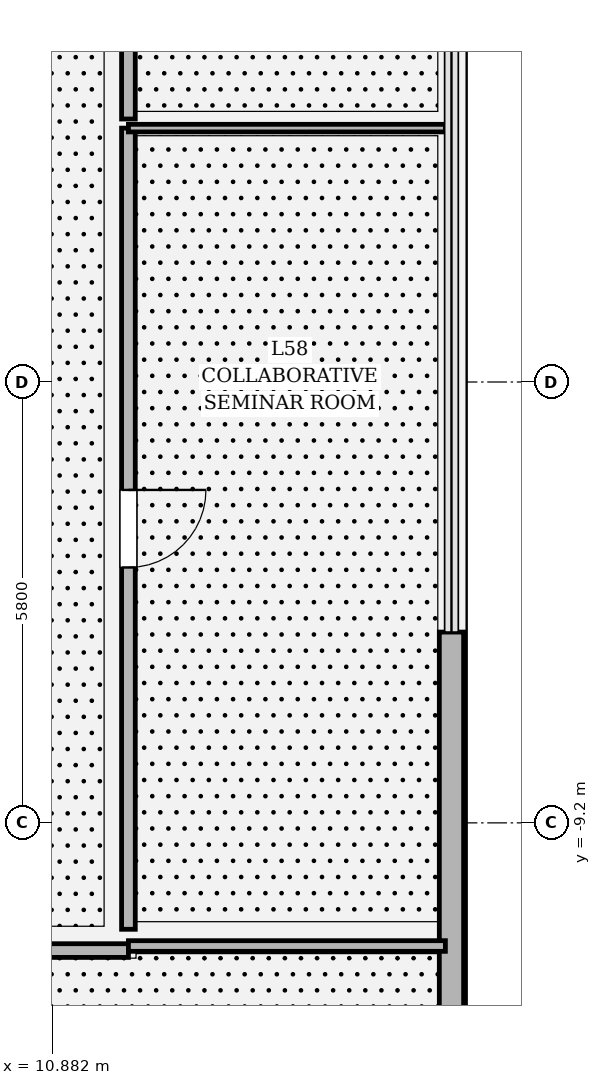
"""IFC4 building model, lengths in metres.
Left out: names, types, materials, properties, quantities, classifications, styles, units other than length and angle.
Written with IfcOpenShell. Run it as: python <this file> out.ifc"""

import sys

from ifc_helpers import new_model, si_unit, direction, frame, frame_2d, origin, place, context, subcontext, project, spatial, rectangle, extrude, element, fill, save


model = new_model("IFC4")
c1 = context("Model", 3, precision=1e-05, world=origin(), true_north=direction((0.0, 1.0)))
c2 = subcontext(c1, "Body", "Model", "MODEL_VIEW")
j1 = project(units=[si_unit("LENGTHUNIT", "METRE"), si_unit("PLANEANGLEUNIT", "RADIAN")], contexts=[c1])
p1 = place(None, origin())
s1 = spatial("IfcSite", under=j1, at=p1, CompositionType="ELEMENT")
p2 = place(p1, origin())
s2 = spatial("IfcBuilding", under=s1, at=p2, CompositionType="ELEMENT")
p3 = place(p2, frame((0.0, 0.0, 246.6)))
s3 = spatial("IfcBuildingStorey", under=s2, at=p3, CompositionType="ELEMENT", Elevation=246.6)
p4 = place(p3, frame((16.13, -13.727, 0.0), z_axis=(0.0, 0.0, 1.0), x_axis=(0.0, 1.0, 0.0)))
e1 = element("IfcWall", 1, at=p4, inside=s3, PredefinedType="SOLIDWALL", context=c2, shape_type="SweptSolid", body=[
    extrude(rectangle(XDim=7.037, YDim=0.32, at=frame_2d((3.519, 0.0))), origin(), (0.0, 0.0, 1.0), 3.194),
])
p5 = place(p3, frame((1.406, -10.88, 0.0), z_axis=(0.0, 0.0, 1.0), x_axis=(1.0, 0.0, 0.0)))
e2 = element("IfcWall", 2, at=p5, inside=s3, PredefinedType="PARTITIONING", context=c2, shape_type="SweptSolid", body=[
    extrude(rectangle(XDim=10.474, YDim=0.18, at=frame_2d((5.237, 0.0))), origin(), (0.0, 0.0, 1.0), 3.194),
])
p6 = place(p5, frame((4.712, 0.0, 0.0)))
e3 = element("IfcOpeningElement", 3, at=p6, cuts=e2, PredefinedType="OPENING", context=c2, shape_type="SweptSolid", body=[
    extrude(rectangle(XDim=1.05, YDim=2.2, at=frame_2d((0.525, 1.1))), frame((0.0, 0.1, 0.0), z_axis=(0.0, -1.0, 0.0), x_axis=(1.0, 0.0, 0.0)), (0.0, 0.0, 1.0), 0.2),
])
p7 = place(p3, frame((11.88, -10.82, 0.0), z_axis=(0.0, 0.0, 1.0), x_axis=(1.0, 0.0, 0.0)))
e4 = element("IfcWall", 4, at=p7, inside=s3, PredefinedType="PARTITIONING", context=c2, shape_type="SweptSolid", body=[
    extrude(rectangle(XDim=4.17, YDim=0.14, at=frame_2d((2.085, 0.0))), origin(), (0.0, 0.0, 1.0), 4.154),
])
p8 = place(p3, frame((11.88, -10.6, 0.0), z_axis=(0.0, 0.0, 1.0), x_axis=(0.0, 1.0, 0.0)))
e5 = element("IfcWall", 5, at=p8, inside=s3, PredefinedType="PARTITIONING", context=c2, shape_type="SweptSolid", body=[
    extrude(rectangle(XDim=10.54, YDim=0.18, at=frame_2d((5.27, 0.0))), origin(), (0.0, 0.0, 1.0), 3.194),
])
p9 = place(p8, frame((4.76, 0.0, 0.0)))
e6 = element("IfcOpeningElement", 6, at=p9, cuts=e5, PredefinedType="OPENING", context=c2, shape_type="SweptSolid", body=[
    extrude(rectangle(XDim=1.02, YDim=2.2, at=frame_2d((0.51, 1.1))), frame((0.0, 0.1, 0.0), z_axis=(0.0, -1.0, 0.0), x_axis=(1.0, 0.0, 0.0)), (0.0, 0.0, 1.0), 0.2),
])
p10 = place(p3, frame((11.88, -0.06, 0.0), z_axis=(0.0, 0.0, 1.0), x_axis=(1.0, 0.0, 0.0)))
e7 = element("IfcWall", 7, at=p10, inside=s3, PredefinedType="PARTITIONING", context=c2, shape_type="SweptSolid", body=[
    extrude(rectangle(XDim=4.17, YDim=0.1, at=frame_2d((2.085, 0.0))), origin(), (0.0, 0.0, 1.0), 4.52),
])
p11 = place(p3, frame((11.88, 0.06, 0.0), z_axis=(0.0, 0.0, 1.0), x_axis=(0.0, 1.0, 0.0)))
e8 = element("IfcWall", 8, at=p11, inside=s3, PredefinedType="PARTITIONING", context=c2, shape_type="SweptSolid", body=[
    extrude(rectangle(XDim=10.54, YDim=0.18, at=frame_2d((5.27, 0.0))), origin(), (0.0, 0.0, 1.0), 3.194),
])
p12 = place(p11, frame((4.76, 0.0, 0.0)))
e9 = element("IfcOpeningElement", 9, at=p12, cuts=e8, PredefinedType="OPENING", context=c2, shape_type="SweptSolid", body=[
    extrude(rectangle(XDim=1.02, YDim=2.2, at=frame_2d((0.51, 1.1))), frame((0.0, 0.1, 0.0), z_axis=(0.0, -1.0, 0.0), x_axis=(1.0, 0.0, 0.0)), (0.0, 0.0, 1.0), 0.2),
])
p13 = place(p9, origin())
e10 = element("IfcDoor", 10, at=p13, inside=s3, OperationType="SINGLE_SWING_RIGHT", PredefinedType="DOOR", context=c2, shape_type="SweptSolid", body=[
    extrude(rectangle(XDim=1.02, YDim=2.2, at=frame_2d((0.51, 1.1))), frame((0.0, 0.025, 0.0), z_axis=(0.0, -1.0, 0.0), x_axis=(1.0, 0.0, 0.0)), (0.0, 0.0, 1.0), 0.05),
])
fill(e6, e10)
save(model, sys.argv[1])
